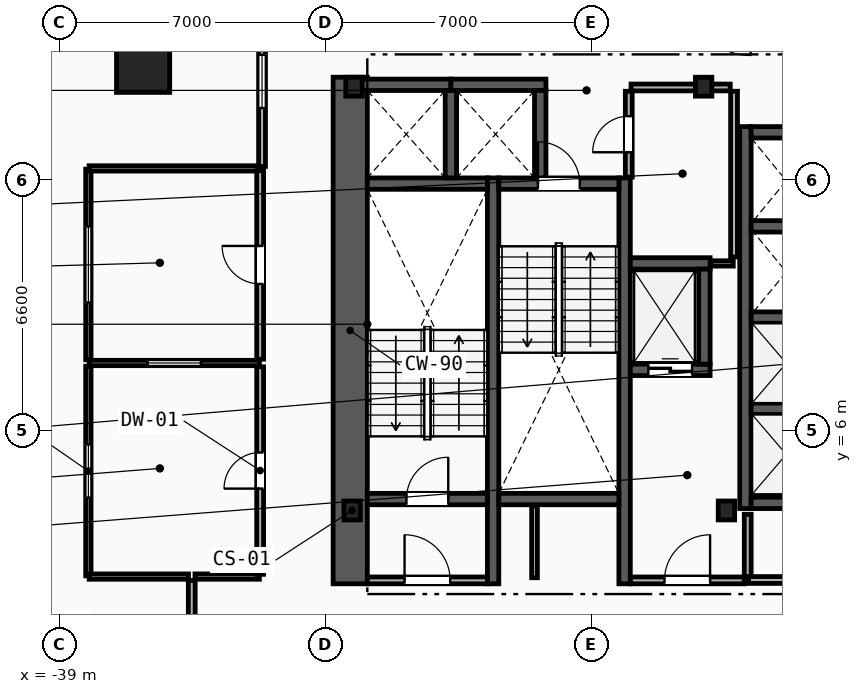
"""IFC4 building model, lengths in metres.
Left out: names, types, materials, properties, quantities, classifications, styles, units other than length and angle.
Written with IfcOpenShell. Run it as: python <this file> out.ifc"""

import sys

from ifc_helpers import new_model, si_unit, direction, frame, frame_2d, origin, origin_2d, place, context, subcontext, project, spatial, rectangle, i_section, extrude, element, fill, save


model = new_model("IFC4")
c1 = context("Model", 3, precision=1e-05, world=origin(), true_north=direction((0.0, 1.0)))
c2 = subcontext(c1, "Body", "Model", "MODEL_VIEW")
j1 = project(units=[si_unit("LENGTHUNIT", "METRE"), si_unit("PLANEANGLEUNIT", "RADIAN")], contexts=[c1])
p1 = place(None, origin())
s1 = spatial("IfcSite", under=j1, at=p1, CompositionType="ELEMENT")
p2 = place(p1, origin())
s2 = spatial("IfcBuilding", under=s1, at=p2, CompositionType="ELEMENT")
p3 = place(p2, frame((0.0, 0.0, 12.0)))
s3 = spatial("IfcBuildingStorey", under=s2, at=p3, CompositionType="ELEMENT", Elevation=12.0)
for number, where, z_axis, x_axis in (
    (1, (-31.3, 3.9, 0.0), (0.0, 0.0, 1.0), (1.0, 0.0, 0.0)),
    (2, (-21.45, 3.9, 0.0), (0.0, 0.0, 1.0), (1.0, 0.0, 0.0)),
    (3, (-22.05, 15.05, 0.0), (0.0, 0.0, 1.0), (1.0, 0.0, 0.0)),
    (4, (-31.25, 15.05, 0.0), (0.0, 0.0, 1.0), (1.0, 0.0, 0.0)),
):
    element("IfcColumn", number, at=place(p3, frame(where, z_axis=z_axis, x_axis=x_axis)), inside=s3, PredefinedType="COLUMN", context=c2, shape_type="SweptSolid", body=[
        extrude(i_section(OverallWidth=0.432, OverallDepth=0.498, WebThickness=0.056, FlangeThickness=0.089, FilletRadius=0.018, at=origin_2d()), origin(), (0.0, 0.0, 1.0), 4.0),
    ])
p4 = place(p3, frame((-36.8, 15.6, 0.0), z_axis=(0.0, 0.0, 1.0), x_axis=(1.0, 0.0, 0.0)))
e5 = element("IfcColumn", 5, at=p4, inside=s3, PredefinedType="COLUMN", context=c2, shape_type="SweptSolid", body=[
    extrude(rectangle(XDim=1.4, YDim=1.4, at=origin_2d()), origin(), (0.0, 0.0, 1.0), 4.0),
])
p5 = place(p3, frame((-31.35, 1.97, 0.0), z_axis=(0.0, 0.0, 1.0), x_axis=(0.0, 1.0, 0.0)))
e6 = element("IfcWall", 6, at=p5, inside=s3, PredefinedType="SHEAR", context=c2, shape_type="SweptSolid", body=[
    extrude(rectangle(XDim=13.33, YDim=0.9, at=frame_2d((6.665, 0.0))), origin(), (0.0, 0.0, 1.0), 3.65),
])
for number, where, z_axis, x_axis in (
    (7, (-27.59, 1.97, 0.0), (0.0, 0.0, 1.0), (0.0, 1.0, 0.0)),
    (8, (-24.13, 1.97, 0.0), (0.0, 0.0, 1.0), (0.0, 1.0, 0.0)),
):
    element("IfcWall", number, at=place(p3, frame(where, z_axis=z_axis, x_axis=x_axis)), inside=s3, PredefinedType="SHEAR", context=c2, shape_type="SweptSolid", body=[
        extrude(rectangle(XDim=10.68, YDim=0.3, at=frame_2d((5.34, 0.0))), origin(), (0.0, 0.0, 1.0), 3.65),
    ])
p6 = place(p3, frame((-30.9, 4.2, 0.0), z_axis=(0.0, 0.0, 1.0), x_axis=(1.0, 0.0, 0.0)))
e9 = element("IfcWall", 9, at=p6, inside=s3, PredefinedType="SHEAR", context=c2, shape_type="SweptSolid", body=[
    extrude(rectangle(XDim=3.16, YDim=0.3, at=frame_2d((1.58, 0.0))), origin(), (0.0, 0.0, 1.0), 3.65),
])
p7 = place(p6, frame((1.03, 0.0, 0.0)))
e10 = element("IfcOpeningElement", 10, at=p7, cuts=e9, PredefinedType="OPENING", context=c2, shape_type="SweptSolid", body=[
    extrude(rectangle(XDim=1.1, YDim=2.15, at=frame_2d((0.55, 1.075))), frame((0.0, 0.16, 0.0), z_axis=(0.0, -1.0, 0.0), x_axis=(1.0, 0.0, 0.0)), (0.0, 0.0, 1.0), 0.32),
])
p8 = place(p3, frame((-30.9, 12.5, 0.0), z_axis=(0.0, 0.0, 1.0), x_axis=(1.0, 0.0, 0.0)))
e11 = element("IfcWall", 11, at=p8, inside=s3, PredefinedType="SHEAR", context=c2, shape_type="SweptSolid", body=[
    extrude(rectangle(XDim=3.16, YDim=0.3, at=frame_2d((1.58, 0.0))), origin(), (0.0, 0.0, 1.0), 3.65),
])
p9 = place(p3, frame((-27.44, 12.5, 0.0), z_axis=(0.0, 0.0, 1.0), x_axis=(1.0, 0.0, 0.0)))
e12 = element("IfcWall", 12, at=p9, inside=s3, PredefinedType="SHEAR", context=c2, shape_type="SweptSolid", body=[
    extrude(rectangle(XDim=3.16, YDim=0.3, at=frame_2d((1.58, 0.0))), origin(), (0.0, 0.0, 1.0), 3.65),
])
p10 = place(p9, frame((1.03, 0.0, 0.0)))
e13 = element("IfcOpeningElement", 13, at=p10, cuts=e12, PredefinedType="OPENING", context=c2, shape_type="SweptSolid", body=[
    extrude(rectangle(XDim=1.1, YDim=2.15, at=frame_2d((0.55, 1.075))), frame((0.0, 0.16, 0.0), z_axis=(0.0, -1.0, 0.0), x_axis=(1.0, 0.0, 0.0)), (0.0, 0.0, 1.0), 0.32),
])
p11 = place(p3, frame((-27.44, 4.2, 0.0), z_axis=(0.0, 0.0, 1.0), x_axis=(1.0, 0.0, 0.0)))
e14 = element("IfcWall", 14, at=p11, inside=s3, PredefinedType="SHEAR", context=c2, shape_type="SweptSolid", body=[
    extrude(rectangle(XDim=3.16, YDim=0.3, at=frame_2d((1.58, 0.0))), origin(), (0.0, 0.0, 1.0), 3.65),
])
p12 = place(p3, frame((-20.89, 2.15, 0.0), z_axis=(0.0, 0.0, 1.0), x_axis=(0.0, 1.0, 0.0)))
e15 = element("IfcWall", 15, at=p12, inside=s3, PredefinedType="PARTITIONING", context=c2, shape_type="SweptSolid", body=[
    extrude(rectangle(XDim=1.65, YDim=0.18, at=frame_2d((0.825, 0.0))), origin(), (0.0, 0.0, 1.0), 3.65),
])
p13 = place(p3, frame((-23.98, 2.06, 0.0), z_axis=(0.0, 0.0, 1.0), x_axis=(1.0, 0.0, 0.0)))
e16 = element("IfcWall", 16, at=p13, inside=s3, PredefinedType="PARTITIONING", context=c2, shape_type="SweptSolid", body=[
    extrude(rectangle(XDim=3.0, YDim=0.18, at=frame_2d((1.5, 0.0))), origin(), (0.0, 0.0, 1.0), 3.65),
])
p14 = place(p13, frame((0.9, 0.0, 0.0)))
e17 = element("IfcOpeningElement", 17, at=p14, cuts=e16, PredefinedType="OPENING", context=c2, shape_type="SweptSolid", body=[
    extrude(rectangle(XDim=1.2, YDim=2.15, at=frame_2d((0.6, 1.075))), frame((0.0, 0.1, 0.0), z_axis=(0.0, -1.0, 0.0), x_axis=(1.0, 0.0, 0.0)), (0.0, 0.0, 1.0), 0.2),
])
p15 = place(p3, frame((-30.9, 2.06, 0.0), z_axis=(0.0, 0.0, 1.0), x_axis=(1.0, 0.0, 0.0)))
e18 = element("IfcWall", 18, at=p15, inside=s3, PredefinedType="PARTITIONING", context=c2, shape_type="SweptSolid", body=[
    extrude(rectangle(XDim=3.16, YDim=0.18, at=frame_2d((1.58, 0.0))), origin(), (0.0, 0.0, 1.0), 3.65),
])
p16 = place(p15, frame((0.98, 0.0, 0.0)))
e19 = element("IfcOpeningElement", 19, at=p16, cuts=e18, PredefinedType="OPENING", context=c2, shape_type="SweptSolid", body=[
    extrude(rectangle(XDim=1.2, YDim=2.15, at=frame_2d((0.6, 1.075))), frame((0.0, 0.1, 0.0), z_axis=(0.0, -1.0, 0.0), x_axis=(1.0, 0.0, 0.0)), (0.0, 0.0, 1.0), 0.2),
])
p17 = place(p3, frame((-23.98, 7.6, 0.0), z_axis=(0.0, 0.0, 1.0), x_axis=(1.0, 0.0, 0.0)))
e20 = element("IfcWall", 20, at=p17, inside=s3, PredefinedType="SHEAR", context=c2, shape_type="SweptSolid", body=[
    extrude(rectangle(XDim=2.1, YDim=0.3, at=frame_2d((1.05, 0.0))), origin(), (0.0, 0.0, 1.0), 3.65),
])
p18 = place(p17, frame((0.475, 0.0, 0.0)))
e21 = element("IfcOpeningElement", 21, at=p18, cuts=e20, PredefinedType="OPENING", context=c2, shape_type="SweptSolid", body=[
    extrude(rectangle(XDim=1.15, YDim=2.2, at=frame_2d((0.575, 1.1))), frame((0.0, 0.16, 0.0), z_axis=(0.0, -1.0, 0.0), x_axis=(1.0, 0.0, 0.0)), (0.0, 0.0, 1.0), 0.32),
])
p19 = place(p3, frame((-23.98, 10.4, 0.0), z_axis=(0.0, 0.0, 1.0), x_axis=(1.0, 0.0, 0.0)))
e22 = element("IfcWall", 22, at=p19, inside=s3, PredefinedType="SHEAR", context=c2, shape_type="SweptSolid", body=[
    extrude(rectangle(XDim=2.1, YDim=0.3, at=frame_2d((1.05, 0.0))), origin(), (0.0, 0.0, 1.0), 3.65),
])
for number, where, z_axis, x_axis in (
    (23, (-22.03, 7.75, 0.0), (0.0, 0.0, 1.0), (0.0, 1.0, 0.0)),
    (24, (-31.2, 15.1, 0.0), (0.0, 0.0, 1.0), (1.0, 0.0, 0.0)),
):
    element("IfcWall", number, at=place(p3, frame(where, z_axis=z_axis, x_axis=x_axis)), inside=s3, PredefinedType="SHEAR", context=c2, shape_type="SweptSolid", body=[
        extrude(rectangle(XDim=2.5, YDim=0.3, at=frame_2d((1.25, 0.0))), origin(), (0.0, 0.0, 1.0), 3.65),
    ])
p20 = place(p3, frame((-28.7, 12.65, 0.0), z_axis=(0.0, 0.0, 1.0), x_axis=(0.0, 1.0, 0.0)))
e25 = element("IfcWall", 25, at=p20, inside=s3, PredefinedType="SHEAR", context=c2, shape_type="SweptSolid", body=[
    extrude(rectangle(XDim=2.3, YDim=0.3, at=frame_2d((1.15, 0.0))), origin(), (0.0, 0.0, 1.0), 3.65),
])
p21 = place(p3, frame((-28.7, 15.1, 0.0), z_axis=(0.0, 0.0, 1.0), x_axis=(1.0, 0.0, 0.0)))
e26 = element("IfcWall", 26, at=p21, inside=s3, PredefinedType="SHEAR", context=c2, shape_type="SweptSolid", body=[
    extrude(rectangle(XDim=2.5, YDim=0.3, at=frame_2d((1.25, 0.0))), origin(), (0.0, 0.0, 1.0), 3.65),
])
p22 = place(p3, frame((-26.35, 12.65, 0.0), z_axis=(0.0, 0.0, 1.0), x_axis=(0.0, 1.0, 0.0)))
e27 = element("IfcWall", 27, at=p22, inside=s3, PredefinedType="SHEAR", context=c2, shape_type="SweptSolid", body=[
    extrude(rectangle(XDim=2.3, YDim=0.3, at=frame_2d((1.15, 0.0))), origin(), (0.0, 0.0, 1.0), 3.65),
])
p23 = place(p3, frame((-20.95, 3.95, 0.0), z_axis=(0.0, 0.0, 1.0), x_axis=(0.0, 1.0, 0.0)))
e28 = element("IfcWall", 28, at=p23, inside=s3, PredefinedType="SHEAR", context=c2, shape_type="SweptSolid", body=[
    extrude(rectangle(XDim=10.05, YDim=0.3, at=frame_2d((5.025, 0.0))), origin(), (0.0, 0.0, 1.0), 3.65),
])
for number, where, z_axis, x_axis in (
    (29, (-20.8, 4.1, 0.0), (0.0, 0.0, 1.0), (1.0, 0.0, 0.0)),
    (30, (-20.8, 13.85, 0.0), (0.0, 0.0, 1.0), (1.0, 0.0, 0.0)),
):
    element("IfcWall", number, at=place(p3, frame(where, z_axis=z_axis, x_axis=x_axis)), inside=s3, PredefinedType="SHEAR", context=c2, shape_type="SweptSolid", body=[
        extrude(rectangle(XDim=2.15, YDim=0.3, at=frame_2d((1.075, 0.0))), origin(), (0.0, 0.0, 1.0), 3.65),
    ])
for number, where, z_axis, x_axis in (
    (31, (-20.8, 6.575, 0.0), (0.0, 0.0, 1.0), (1.0, 0.0, 0.0)),
    (32, (-20.8, 8.975, 0.0), (0.0, 0.0, 1.0), (1.0, 0.0, 0.0)),
    (33, (-20.8, 11.375, 0.0), (0.0, 0.0, 1.0), (1.0, 0.0, 0.0)),
):
    element("IfcWall", number, at=place(p3, frame(where, z_axis=z_axis, x_axis=x_axis)), inside=s3, PredefinedType="SHEAR", context=c2, shape_type="SweptSolid", body=[
        extrude(rectangle(XDim=1.85, YDim=0.3, at=frame_2d((0.925, 0.0))), origin(), (0.0, 0.0, 1.0), 3.65),
    ])
p24 = place(p3, frame((-20.87, 2.07, 0.0), z_axis=(0.0, 0.0, 1.0), x_axis=(1.0, 0.0, 0.0)))
e34 = element("IfcWall", 34, at=p24, inside=s3, PredefinedType="PARTITIONING", context=c2, shape_type="SweptSolid", body=[
    extrude(rectangle(XDim=3.83, YDim=0.18, at=frame_2d((1.915, 0.0))), origin(), (0.0, 0.0, 1.0), 3.65),
])
p25 = place(p24, frame((1.44, 0.0, 0.0)))
e35 = element("IfcOpeningElement", 35, at=p25, cuts=e34, PredefinedType="OPENING", context=c2, shape_type="SweptSolid", body=[
    extrude(rectangle(XDim=0.95, YDim=2.1, at=frame_2d((0.475, 1.05))), frame((0.0, 0.1, 0.0), z_axis=(0.0, -1.0, 0.0), x_axis=(1.0, 0.0, 0.0)), (0.0, 0.0, 1.0), 0.2),
])
p26 = place(p3, frame((-21.86, 10.4, 0.0), z_axis=(0.0, 0.0, 1.0), x_axis=(1.0, 0.0, 0.0)))
e36 = element("IfcWall", 36, at=p26, inside=s3, PredefinedType="PARTITIONING", context=c2, shape_type="SweptSolid", body=[
    extrude(rectangle(XDim=0.59, YDim=0.14, at=frame_2d((0.295, 0.0))), origin(), (0.0, 0.0, 1.0), 3.65),
])
p27 = place(p3, frame((-21.25, 10.57, 0.0), z_axis=(0.0, 0.0, 1.0), x_axis=(0.0, 1.0, 0.0)))
e37 = element("IfcWall", 37, at=p27, inside=s3, PredefinedType="PARTITIONING", context=c2, shape_type="SweptSolid", body=[
    extrude(rectangle(XDim=4.36, YDim=0.18, at=frame_2d((2.18, 0.0))), origin(), (0.0, 0.0, 1.0), 3.65),
])
p28 = place(p3, frame((-23.96, 15.03, 0.0), z_axis=(0.0, 0.0, 1.0), x_axis=(1.0, 0.0, 0.0)))
e38 = element("IfcWall", 38, at=p28, inside=s3, PredefinedType="PARTITIONING", context=c2, shape_type="SweptSolid", body=[
    extrude(rectangle(XDim=2.61, YDim=0.18, at=frame_2d((1.305, 0.0))), origin(), (0.0, 0.0, 1.0), 2.723),
])
p29 = place(p3, frame((-24.02, 12.67, 0.0), z_axis=(0.0, 0.0, 1.0), x_axis=(0.0, 1.0, 0.0)))
e39 = element("IfcWall", 39, at=p29, inside=s3, PredefinedType="PARTITIONING", context=c2, shape_type="SweptSolid", body=[
    extrude(rectangle(XDim=2.26, YDim=0.18, at=frame_2d((1.13, 0.0))), origin(), (0.0, 0.0, 1.0), 3.65),
])
p30 = place(p29, frame((0.655, 0.0, 0.0)))
e40 = element("IfcOpeningElement", 40, at=p30, cuts=e39, PredefinedType="OPENING", context=c2, shape_type="SweptSolid", body=[
    extrude(rectangle(XDim=0.95, YDim=2.1, at=frame_2d((0.475, 1.05))), frame((0.0, 0.1, 0.0), z_axis=(0.0, -1.0, 0.0), x_axis=(1.0, 0.0, 0.0)), (0.0, 0.0, 1.0), 0.2),
])
p31 = place(p3, frame((-38.24, 2.18, 0.0), z_axis=(0.0, 0.0, 1.0), x_axis=(0.0, 1.0, 0.0)))
e41 = element("IfcWall", 41, at=p31, inside=s3, PredefinedType="PARTITIONING", context=c2, shape_type="SweptSolid", body=[
    extrude(rectangle(XDim=5.515, YDim=0.14, at=frame_2d((2.758, 0.0))), origin(), (0.0, 0.0, 1.0), 3.65),
])
p32 = place(p31, frame((2.058, 0.0, 1.05)))
e42 = element("IfcOpeningElement", 42, at=p32, cuts=e41, PredefinedType="OPENING", context=c2, shape_type="SweptSolid", body=[
    extrude(rectangle(XDim=1.4, YDim=1.5, at=frame_2d((0.7, 0.75))), frame((0.0, 0.08, 0.0), z_axis=(0.0, -1.0, 0.0), x_axis=(1.0, 0.0, 0.0)), (0.0, 0.0, 1.0), 0.16),
])
p33 = place(p3, frame((-38.24, 7.865, 0.0), z_axis=(0.0, 0.0, 1.0), x_axis=(0.0, 1.0, 0.0)))
e43 = element("IfcWall", 43, at=p33, inside=s3, PredefinedType="PARTITIONING", context=c2, shape_type="SweptSolid", body=[
    extrude(rectangle(XDim=5.015, YDim=0.14, at=frame_2d((2.507, 0.0))), origin(), (0.0, 0.0, 1.0), 3.65),
])
p34 = place(p33, frame((1.508, 0.0, 1.05)))
e44 = element("IfcOpeningElement", 44, at=p34, cuts=e43, PredefinedType="OPENING", context=c2, shape_type="SweptSolid", body=[
    extrude(rectangle(XDim=2.0, YDim=1.5, at=frame_2d((1.0, 0.75))), frame((0.0, 0.08, 0.0), z_axis=(0.0, -1.0, 0.0), x_axis=(1.0, 0.0, 0.0)), (0.0, 0.0, 1.0), 0.16),
])
p35 = place(p3, frame((-38.22, 2.16, 0.0), z_axis=(0.0, 0.0, 1.0), x_axis=(1.0, 0.0, 0.0)))
e45 = element("IfcWall", 45, at=p35, inside=s3, PredefinedType="PARTITIONING", context=c2, shape_type="SweptSolid", body=[
    extrude(rectangle(XDim=2.615, YDim=0.14, at=frame_2d((1.308, 0.0))), origin(), (0.0, 0.0, 1.0), 3.65),
])
p36 = place(p3, frame((-35.435, 2.16, 0.0), z_axis=(0.0, 0.0, 1.0), x_axis=(1.0, 0.0, 0.0)))
e46 = element("IfcWall", 46, at=p36, inside=s3, PredefinedType="PARTITIONING", context=c2, shape_type="SweptSolid", body=[
    extrude(rectangle(XDim=1.695, YDim=0.14, at=frame_2d((0.848, 0.0))), origin(), (0.0, 0.0, 1.0), 3.65),
])
p37 = place(p3, frame((-38.22, 7.78, 0.0), z_axis=(0.0, 0.0, 1.0), x_axis=(1.0, 0.0, 0.0)))
e47 = element("IfcWall", 47, at=p37, inside=s3, PredefinedType="PARTITIONING", context=c2, shape_type="SweptSolid", body=[
    extrude(rectangle(XDim=4.48, YDim=0.14, at=frame_2d((2.24, 0.0))), origin(), (0.0, 0.0, 1.0), 3.65),
])
p38 = place(p37, frame((1.54, 0.0, 1.05)))
e48 = element("IfcOpeningElement", 48, at=p38, cuts=e47, PredefinedType="OPENING", context=c2, shape_type="SweptSolid", body=[
    extrude(rectangle(XDim=1.4, YDim=1.5, at=frame_2d((0.7, 0.75))), frame((0.0, 0.08, 0.0), z_axis=(0.0, -1.0, 0.0), x_axis=(1.0, 0.0, 0.0)), (0.0, 0.0, 1.0), 0.16),
])
p39 = place(p3, frame((-38.22, 12.9, 0.0), z_axis=(0.0, 0.0, 1.0), x_axis=(1.0, 0.0, 0.0)))
e49 = element("IfcWall", 49, at=p39, inside=s3, PredefinedType="PARTITIONING", context=c2, shape_type="SweptSolid", body=[
    extrude(rectangle(XDim=4.48, YDim=0.14, at=frame_2d((2.24, 0.0))), origin(), (0.0, 0.0, 1.0), 3.65),
])
p40 = place(p3, frame((-33.72, 2.22, 0.0), z_axis=(0.0, 0.0, 1.0), x_axis=(0.0, 1.0, 0.0)))
e50 = element("IfcWall", 50, at=p40, inside=s3, PredefinedType="PARTITIONING", context=c2, shape_type="SweptSolid", body=[
    extrude(rectangle(XDim=5.46, YDim=0.18, at=frame_2d((2.73, 0.0))), origin(), (0.0, 0.0, 1.0), 3.65),
])
p41 = place(p40, frame((2.255, 0.0, 0.0)))
e51 = element("IfcOpeningElement", 51, at=p41, cuts=e50, PredefinedType="OPENING", context=c2, shape_type="SweptSolid", body=[
    extrude(rectangle(XDim=0.95, YDim=2.1, at=frame_2d((0.475, 1.05))), frame((0.0, 0.1, 0.0), z_axis=(0.0, -1.0, 0.0), x_axis=(1.0, 0.0, 0.0)), (0.0, 0.0, 1.0), 0.2),
])
p42 = place(p3, frame((-33.72, 7.88, 0.0), z_axis=(0.0, 0.0, 1.0), x_axis=(0.0, 1.0, 0.0)))
e52 = element("IfcWall", 52, at=p42, inside=s3, PredefinedType="PARTITIONING", context=c2, shape_type="SweptSolid", body=[
    extrude(rectangle(XDim=4.96, YDim=0.18, at=frame_2d((2.48, 0.0))), origin(), (0.0, 0.0, 1.0), 3.65),
])
p43 = place(p42, frame((1.98, 0.0, 0.0)))
e53 = element("IfcOpeningElement", 53, at=p43, cuts=e52, PredefinedType="OPENING", context=c2, shape_type="SweptSolid", body=[
    extrude(rectangle(XDim=1.0, YDim=2.15, at=frame_2d((0.5, 1.075))), frame((0.0, 0.1, 0.0), z_axis=(0.0, -1.0, 0.0), x_axis=(1.0, 0.0, 0.0)), (0.0, 0.0, 1.0), 0.2),
])
p44 = place(p3, frame((-26.5, 2.13, 0.0), z_axis=(0.0, 0.0, 1.0), x_axis=(0.0, 1.0, 0.0)))
e54 = element("IfcWall", 54, at=p44, inside=s3, PredefinedType="PARTITIONING", context=c2, shape_type="SweptSolid", body=[
    extrude(rectangle(XDim=1.89, YDim=0.15, at=frame_2d((0.945, 0.0))), origin(), (0.0, 0.0, 1.0), 3.65),
])
p45 = place(p3, frame((-33.67, 17.428, 0.0), z_axis=(0.0, 0.0, 1.0), x_axis=(0.0, -1.0, 0.0)))
e55 = element("IfcWall", 55, at=p45, inside=s3, PredefinedType="PARTITIONING", context=c2, shape_type="SweptSolid", body=[
    extrude(rectangle(XDim=4.477, YDim=0.18, at=frame_2d((2.239, 0.0))), origin(), (0.0, 0.0, 1.0), 3.65),
])
p46 = place(p45, frame((1.539, 0.0, 1.05)))
e56 = element("IfcOpeningElement", 56, at=p46, cuts=e55, PredefinedType="OPENING", context=c2, shape_type="SweptSolid", body=[
    extrude(rectangle(XDim=1.4, YDim=1.5, at=frame_2d((0.7, 0.75))), frame((0.0, 0.1, 0.0), z_axis=(0.0, -1.0, 0.0), x_axis=(1.0, 0.0, 0.0)), (0.0, 0.0, 1.0), 0.2),
])
p47 = place(p3, frame((-35.52, 2.059, 0.0), z_axis=(0.0, 0.0, 1.0), x_axis=(0.0, -1.0, 0.0)))
e57 = element("IfcWall", 57, at=p47, inside=s3, PredefinedType="PARTITIONING", context=c2, shape_type="SweptSolid", body=[
    extrude(rectangle(XDim=4.117, YDim=0.18, at=frame_2d((2.059, 0.0))), origin(), (0.0, 0.0, 1.0), 3.65),
])
p48 = place(p7, origin())
e58 = element("IfcDoor", 58, at=p48, inside=s3, OperationType="SINGLE_SWING_RIGHT", PredefinedType="DOOR", context=c2, shape_type="SweptSolid", body=[
    extrude(rectangle(XDim=1.1, YDim=2.15, at=frame_2d((0.55, 1.075))), frame((0.0, 0.025, 0.0), z_axis=(0.0, -1.0, 0.0), x_axis=(1.0, 0.0, 0.0)), (0.0, 0.0, 1.0), 0.05),
])
fill(e10, e58)
p49 = place(p10, origin())
e59 = element("IfcDoor", 59, at=p49, inside=s3, OperationType="SINGLE_SWING_LEFT", PredefinedType="DOOR", context=c2, shape_type="SweptSolid", body=[
    extrude(rectangle(XDim=1.1, YDim=2.15, at=frame_2d((0.55, 1.075))), frame((0.0, 0.025, 0.0), z_axis=(0.0, -1.0, 0.0), x_axis=(1.0, 0.0, 0.0)), (0.0, 0.0, 1.0), 0.05),
])
fill(e13, e59)
p50 = place(p14, origin())
e60 = element("IfcDoor", 60, at=p50, inside=s3, OperationType="SINGLE_SWING_RIGHT", PredefinedType="DOOR", context=c2, shape_type="SweptSolid", body=[
    extrude(rectangle(XDim=1.2, YDim=2.15, at=frame_2d((0.6, 1.075))), frame((0.0, 0.025, 0.0), z_axis=(0.0, -1.0, 0.0), x_axis=(1.0, 0.0, 0.0)), (0.0, 0.0, 1.0), 0.05),
])
fill(e17, e60)
p51 = place(p16, origin())
e61 = element("IfcDoor", 61, at=p51, inside=s3, OperationType="SINGLE_SWING_LEFT", PredefinedType="DOOR", context=c2, shape_type="SweptSolid", body=[
    extrude(rectangle(XDim=1.2, YDim=2.15, at=frame_2d((0.6, 1.075))), frame((0.0, 0.025, 0.0), z_axis=(0.0, -1.0, 0.0), x_axis=(1.0, 0.0, 0.0)), (0.0, 0.0, 1.0), 0.05),
])
fill(e19, e61)
p52 = place(p18, origin())
e62 = element("IfcDoor", 62, at=p52, inside=s3, OperationType="SLIDING_TO_LEFT", PredefinedType="TRAPDOOR", context=c2, shape_type="SweptSolid", body=[
    extrude(rectangle(XDim=1.15, YDim=2.2, at=frame_2d((0.575, 1.1))), frame((0.0, 0.025, 0.0), z_axis=(0.0, -1.0, 0.0), x_axis=(1.0, 0.0, 0.0)), (0.0, 0.0, 1.0), 0.05),
])
fill(e21, e62)
p53 = place(p41, origin())
e63 = element("IfcDoor", 63, at=p53, inside=s3, OperationType="SINGLE_SWING_LEFT", PredefinedType="DOOR", context=c2, shape_type="SweptSolid", body=[
    extrude(rectangle(XDim=0.95, YDim=2.1, at=frame_2d((0.475, 1.05))), frame((0.0, 0.025, 0.0), z_axis=(0.0, -1.0, 0.0), x_axis=(1.0, 0.0, 0.0)), (0.0, 0.0, 1.0), 0.05),
])
fill(e51, e63)
p54 = place(p43, origin())
e64 = element("IfcDoor", 64, at=p54, inside=s3, OperationType="SINGLE_SWING_RIGHT", PredefinedType="DOOR", context=c2, shape_type="SweptSolid", body=[
    extrude(rectangle(XDim=1.0, YDim=2.15, at=frame_2d((0.5, 1.075))), frame((0.0, 0.025, 0.0), z_axis=(0.0, -1.0, 0.0), x_axis=(1.0, 0.0, 0.0)), (0.0, 0.0, 1.0), 0.05),
])
fill(e53, e64)
p55 = place(p30, origin())
e65 = element("IfcDoor", 65, at=p55, inside=s3, OperationType="SINGLE_SWING_LEFT", PredefinedType="DOOR", context=c2, shape_type="SweptSolid", body=[
    extrude(rectangle(XDim=0.95, YDim=2.1, at=frame_2d((0.475, 1.05))), frame((0.0, 0.025, 0.0), z_axis=(0.0, -1.0, 0.0), x_axis=(1.0, 0.0, 0.0)), (0.0, 0.0, 1.0), 0.05),
])
fill(e40, e65)
p56 = place(p32, origin())
e66 = element("IfcWindow", 66, at=p56, inside=s3, PartitioningType="SINGLE_PANEL", PredefinedType="WINDOW", context=c2, shape_type="SweptSolid", body=[
    extrude(rectangle(XDim=1.4, YDim=1.5, at=frame_2d((0.7, 0.75))), frame((0.0, 0.03, 0.0), z_axis=(0.0, -1.0, 0.0), x_axis=(1.0, 0.0, 0.0)), (0.0, 0.0, 1.0), 0.06),
])
fill(e42, e66)
p57 = place(p34, origin())
e67 = element("IfcWindow", 67, at=p57, inside=s3, PartitioningType="SINGLE_PANEL", PredefinedType="WINDOW", context=c2, shape_type="SweptSolid", body=[
    extrude(rectangle(XDim=2.0, YDim=1.5, at=frame_2d((1.0, 0.75))), frame((0.0, 0.03, 0.0), z_axis=(0.0, -1.0, 0.0), x_axis=(1.0, 0.0, 0.0)), (0.0, 0.0, 1.0), 0.06),
])
fill(e44, e67)
p58 = place(p38, origin())
e68 = element("IfcWindow", 68, at=p58, inside=s3, PartitioningType="SINGLE_PANEL", PredefinedType="WINDOW", context=c2, shape_type="SweptSolid", body=[
    extrude(rectangle(XDim=1.4, YDim=1.5, at=frame_2d((0.7, 0.75))), frame((0.0, 0.03, 0.0), z_axis=(0.0, -1.0, 0.0), x_axis=(1.0, 0.0, 0.0)), (0.0, 0.0, 1.0), 0.06),
])
fill(e48, e68)
p59 = place(p46, origin())
e69 = element("IfcWindow", 69, at=p59, inside=s3, PartitioningType="SINGLE_PANEL", PredefinedType="WINDOW", context=c2, shape_type="SweptSolid", body=[
    extrude(rectangle(XDim=1.4, YDim=1.5, at=frame_2d((0.7, 0.75))), frame((0.0, 0.03, 0.0), z_axis=(0.0, -1.0, 0.0), x_axis=(1.0, 0.0, 0.0)), (0.0, 0.0, 1.0), 0.06),
])
fill(e56, e69)
save(model, sys.argv[1])
